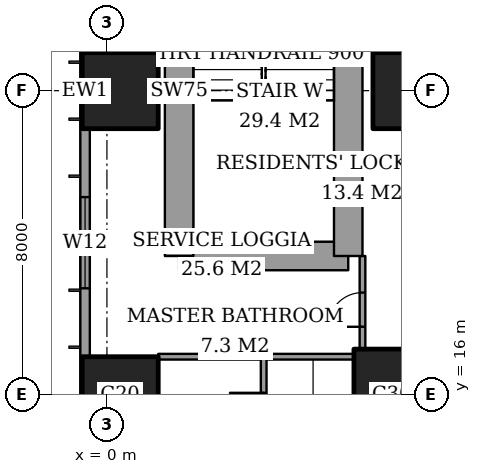
"""IFC4 building model, lengths in metres.
Left out: names, types, materials, properties, quantities, classifications, styles, units other than length and angle.
Written with IfcOpenShell. Run it as: python <this file> out.ifc"""

import sys

from ifc_helpers import new_model, si_unit, direction, frame, frame_2d, origin, origin_2d, place, context, subcontext, project, spatial, rectangle, extrude, element, fill, save


model = new_model("IFC4")
c1 = context("Model", 3, precision=1e-05, world=origin(), true_north=direction((0.0, 1.0)))
c2 = subcontext(c1, "Body", "Model", "MODEL_VIEW")
j1 = project(units=[si_unit("LENGTHUNIT", "METRE"), si_unit("PLANEANGLEUNIT", "RADIAN")], contexts=[c1])
p1 = place(None, origin())
s1 = spatial("IfcSite", under=j1, at=p1, CompositionType="ELEMENT")
p2 = place(p1, origin())
s2 = spatial("IfcBuilding", under=s1, at=p2, CompositionType="ELEMENT")
p3 = place(p2, frame((0.0, 0.0, 146.6)))
s3 = spatial("IfcBuildingStorey", under=s2, at=p3, CompositionType="ELEMENT", Elevation=146.6)
for number, where, z_axis, x_axis in (
    (1, (0.35, 16.0, 0.0), (0.0, 0.0, 1.0), (1.0, 0.0, 0.0)),
    (2, (0.35, 24.0, 0.0), (0.0, 0.0, 1.0), (1.0, 0.0, 0.0)),
):
    element("IfcColumn", number, at=place(p3, frame(where, z_axis=z_axis, x_axis=x_axis)), inside=s3, PredefinedType="COLUMN", context=c2, shape_type="SweptSolid", body=[
        extrude(rectangle(XDim=2.0, YDim=2.0, at=origin_2d()), origin(), (0.0, 0.0, 1.0), 3.6),
    ])
p4 = place(p3, frame((8.0, 16.0, 0.0), z_axis=(0.0, 0.0, 1.0), x_axis=(1.0, 0.0, 0.0)))
e3 = element("IfcColumn", 3, at=p4, inside=s3, PredefinedType="COLUMN", context=c2, shape_type="SweptSolid", body=[
    extrude(rectangle(XDim=3.0, YDim=2.4, at=origin_2d()), origin(), (0.0, 0.0, 1.0), 3.6),
])
p5 = place(p3, frame((8.0, 24.0, 0.0), z_axis=(0.0, 0.0, 1.0), x_axis=(1.0, 0.0, 0.0)))
e4 = element("IfcColumn", 4, at=p5, inside=s3, PredefinedType="COLUMN", context=c2, shape_type="SweptSolid", body=[
    extrude(rectangle(XDim=2.0, YDim=2.0, at=origin_2d()), origin(), (0.0, 0.0, 1.0), 3.6),
])
p6 = place(p3, frame((1.9, 19.65, 0.0), z_axis=(0.0, 0.0, 1.0), x_axis=(1.0, 0.0, 0.0)))
e5 = element("IfcWall", 5, at=p6, inside=s3, PredefinedType="SHEAR", context=c2, shape_type="SweptSolid", body=[
    extrude(rectangle(XDim=4.45, YDim=0.75, at=frame_2d((2.225, 0.0))), origin(), (0.0, 0.0, 1.0), 3.6),
])
p7 = place(p3, frame((6.35, 19.65, 0.0), z_axis=(0.0, 0.0, 1.0), x_axis=(0.0, 1.0, 0.0)))
e6 = element("IfcWall", 6, at=p7, inside=s3, PredefinedType="SHEAR", context=c2, shape_type="SweptSolid", body=[
    extrude(rectangle(XDim=8.7, YDim=0.75, at=frame_2d((4.35, 0.0))), origin(), (0.0, 0.0, 1.0), 3.6),
])
p8 = place(p7, frame((6.725, 0.0, 0.0)))
e7 = element("IfcOpeningElement", 7, at=p8, cuts=e6, PredefinedType="OPENING", context=c2, shape_type="SweptSolid", body=[
    extrude(rectangle(XDim=1.0, YDim=2.1, at=frame_2d((0.5, 1.05))), frame((0.0, 0.385, 0.0), z_axis=(0.0, -1.0, 0.0), x_axis=(1.0, 0.0, 0.0)), (0.0, 0.0, 1.0), 0.77),
])
p9 = place(p3, frame((1.9, 28.35, 0.0), z_axis=(0.0, 0.0, 1.0), x_axis=(0.0, -1.0, 0.0)))
e8 = element("IfcWall", 8, at=p9, inside=s3, PredefinedType="SHEAR", context=c2, shape_type="SweptSolid", body=[
    extrude(rectangle(XDim=8.7, YDim=0.75, at=frame_2d((4.35, 0.0))), origin(), (0.0, 0.0, 1.0), 3.6),
])
p10 = place(p3, frame((-0.575, 44.825, 0.0), z_axis=(0.0, 0.0, 1.0), x_axis=(0.0, -1.0, 0.0)))
e9 = element("IfcWall", 9, at=p10, inside=s3, PredefinedType="SOLIDWALL", context=c2, shape_type="SweptSolid", body=[
    extrude(rectangle(XDim=41.65, YDim=0.25, at=frame_2d((20.825, 0.0))), origin(), (0.0, 0.0, 1.0), 3.6),
])
p11 = place(p10, frame((0.775, 0.0, 0.4)))
e10 = element("IfcOpeningElement", 10, at=p11, cuts=e9, PredefinedType="OPENING", context=c2, shape_type="SweptSolid", body=[
    extrude(rectangle(XDim=2.4, YDim=2.2, at=frame_2d((1.2, 1.1))), frame((0.0, 0.135, 0.0), z_axis=(0.0, -1.0, 0.0), x_axis=(1.0, 0.0, 0.0)), (0.0, 0.0, 1.0), 0.27),
])
p12 = place(p10, frame((6.1, 0.0, 0.4)))
e11 = element("IfcOpeningElement", 11, at=p12, cuts=e9, PredefinedType="OPENING", context=c2, shape_type="SweptSolid", body=[
    extrude(rectangle(XDim=1.2, YDim=2.2, at=frame_2d((0.6, 1.1))), frame((0.0, 0.135, 0.0), z_axis=(0.0, -1.0, 0.0), x_axis=(1.0, 0.0, 0.0)), (0.0, 0.0, 1.0), 0.27),
])
p13 = place(p10, frame((8.425, 0.0, 0.4)))
e12 = element("IfcOpeningElement", 12, at=p13, cuts=e9, PredefinedType="OPENING", context=c2, shape_type="SweptSolid", body=[
    extrude(rectangle(XDim=2.4, YDim=2.2, at=frame_2d((1.2, 1.1))), frame((0.0, 0.135, 0.0), z_axis=(0.0, -1.0, 0.0), x_axis=(1.0, 0.0, 0.0)), (0.0, 0.0, 1.0), 0.27),
])
p14 = place(p10, frame((15.625, 0.0, 0.4)))
e13 = element("IfcOpeningElement", 13, at=p14, cuts=e9, PredefinedType="OPENING", context=c2, shape_type="SweptSolid", body=[
    extrude(rectangle(XDim=2.4, YDim=2.2, at=frame_2d((1.2, 1.1))), frame((0.0, 0.135, 0.0), z_axis=(0.0, -1.0, 0.0), x_axis=(1.0, 0.0, 0.0)), (0.0, 0.0, 1.0), 0.27),
])
p15 = place(p10, frame((23.625, 0.0, 0.4)))
e14 = element("IfcOpeningElement", 14, at=p15, cuts=e9, PredefinedType="OPENING", context=c2, shape_type="SweptSolid", body=[
    extrude(rectangle(XDim=2.4, YDim=2.2, at=frame_2d((1.2, 1.1))), frame((0.0, 0.135, 0.0), z_axis=(0.0, -1.0, 0.0), x_axis=(1.0, 0.0, 0.0)), (0.0, 0.0, 1.0), 0.27),
])
p16 = place(p10, frame((30.625, 0.0, 0.4)))
e15 = element("IfcOpeningElement", 15, at=p16, cuts=e9, PredefinedType="OPENING", context=c2, shape_type="SweptSolid", body=[
    extrude(rectangle(XDim=2.4, YDim=2.2, at=frame_2d((1.2, 1.1))), frame((0.0, 0.135, 0.0), z_axis=(0.0, -1.0, 0.0), x_axis=(1.0, 0.0, 0.0)), (0.0, 0.0, 1.0), 0.27),
])
p17 = place(p10, frame((34.225, 0.0, 0.4)))
e16 = element("IfcOpeningElement", 16, at=p17, cuts=e9, PredefinedType="OPENING", context=c2, shape_type="SweptSolid", body=[
    extrude(rectangle(XDim=1.2, YDim=2.2, at=frame_2d((0.6, 1.1))), frame((0.0, 0.135, 0.0), z_axis=(0.0, -1.0, 0.0), x_axis=(1.0, 0.0, 0.0)), (0.0, 0.0, 1.0), 0.27),
])
p18 = place(p10, frame((38.475, 0.0, 0.4)))
e17 = element("IfcOpeningElement", 17, at=p18, cuts=e9, PredefinedType="OPENING", context=c2, shape_type="SweptSolid", body=[
    extrude(rectangle(XDim=2.4, YDim=2.2, at=frame_2d((1.2, 1.1))), frame((0.0, 0.135, 0.0), z_axis=(0.0, -1.0, 0.0), x_axis=(1.0, 0.0, 0.0)), (0.0, 0.0, 1.0), 0.27),
])
p19 = place(p3, frame((1.35, 17.0, 0.0), z_axis=(0.0, 0.0, 1.0), x_axis=(1.0, 0.0, 0.0)))
e18 = element("IfcWall", 18, at=p19, inside=s3, PredefinedType="PARTITIONING", context=c2, shape_type="SweptSolid", body=[
    extrude(rectangle(XDim=5.15, YDim=0.15, at=frame_2d((2.575, 0.0))), origin(), (0.0, 0.0, 1.0), 3.35),
])
p20 = place(p3, frame((4.125, 14.2, 0.0), z_axis=(0.0, 0.0, 1.0), x_axis=(0.0, 1.0, 0.0)))
e19 = element("IfcWall", 19, at=p20, inside=s3, PredefinedType="PARTITIONING", context=c2, shape_type="SweptSolid", body=[
    extrude(rectangle(XDim=2.8, YDim=0.15, at=frame_2d((1.4, 0.0))), origin(), (0.0, 0.0, 1.0), 3.35),
])
p21 = place(p20, frame((0.95, 0.0, 0.0)))
e20 = element("IfcOpeningElement", 20, at=p21, cuts=e19, PredefinedType="OPENING", context=c2, shape_type="SweptSolid", body=[
    extrude(rectangle(XDim=0.9, YDim=2.1, at=frame_2d((0.45, 1.05))), frame((0.0, 0.085, 0.0), z_axis=(0.0, -1.0, 0.0), x_axis=(1.0, 0.0, 0.0)), (0.0, 0.0, 1.0), 0.17),
])
p22 = place(p3, frame((6.725, 17.2, 0.0), z_axis=(0.0, 0.0, 1.0), x_axis=(0.0, 1.0, 0.0)))
e21 = element("IfcWall", 21, at=p22, inside=s3, PredefinedType="PARTITIONING", context=c2, shape_type="SweptSolid", body=[
    extrude(rectangle(XDim=2.45, YDim=0.15, at=frame_2d((1.225, 0.0))), origin(), (0.0, 0.0, 1.0), 3.35),
])
p23 = place(p22, frame((0.587, 0.0, 0.0)))
e22 = element("IfcOpeningElement", 22, at=p23, cuts=e21, PredefinedType="OPENING", context=c2, shape_type="SweptSolid", body=[
    extrude(rectangle(XDim=0.9, YDim=2.1, at=frame_2d((0.45, 1.05))), frame((0.0, 0.085, 0.0), z_axis=(0.0, -1.0, 0.0), x_axis=(1.0, 0.0, 0.0)), (0.0, 0.0, 1.0), 0.17),
])
p24 = place(p15, origin())
e23 = element("IfcWindow", 23, at=p24, inside=s3, PartitioningType="SINGLE_PANEL", PredefinedType="WINDOW", context=c2, shape_type="SweptSolid", body=[
    extrude(rectangle(XDim=2.4, YDim=2.2, at=frame_2d((1.2, 1.1))), frame((0.0, 0.03, 0.0), z_axis=(0.0, -1.0, 0.0), x_axis=(1.0, 0.0, 0.0)), (0.0, 0.0, 1.0), 0.06),
])
fill(e14, e23)
p25 = place(p21, origin())
e24 = element("IfcDoor", 24, at=p25, inside=s3, OperationType="SINGLE_SWING_LEFT", PredefinedType="DOOR", context=c2, shape_type="SweptSolid", body=[
    extrude(rectangle(XDim=0.9, YDim=2.1, at=frame_2d((0.45, 1.05))), frame((0.0, 0.025, 0.0), z_axis=(0.0, -1.0, 0.0), x_axis=(1.0, 0.0, 0.0)), (0.0, 0.0, 1.0), 0.05),
])
fill(e20, e24)
p26 = place(p23, origin())
e25 = element("IfcDoor", 25, at=p26, inside=s3, OperationType="SINGLE_SWING_RIGHT", PredefinedType="DOOR", context=c2, shape_type="SweptSolid", body=[
    extrude(rectangle(XDim=0.9, YDim=2.1, at=frame_2d((0.45, 1.05))), frame((0.0, 0.025, 0.0), z_axis=(0.0, -1.0, 0.0), x_axis=(1.0, 0.0, 0.0)), (0.0, 0.0, 1.0), 0.05),
])
fill(e22, e25)
save(model, sys.argv[1])
